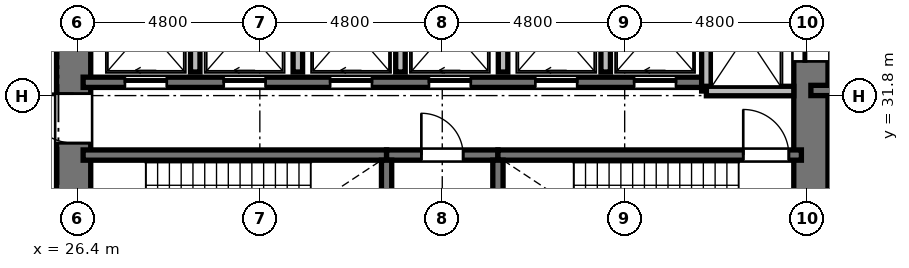
"""IFC4 building model, lengths in metres.
Left out: names, types, materials, properties, quantities, classifications, styles, units other than length and angle.
Written with IfcOpenShell. Run it as: python <this file> out.ifc"""

import sys

from ifc_helpers import new_model, si_unit, direction, frame, frame_2d, origin, place, context, subcontext, project, spatial, rectangle, extrude, element, fill, save


model = new_model("IFC4")
c1 = context("Model", 3, precision=1e-05, world=origin(), true_north=direction((0.0, 1.0)))
c2 = subcontext(c1, "Body", "Model", "MODEL_VIEW")
j1 = project(units=[si_unit("LENGTHUNIT", "METRE"), si_unit("PLANEANGLEUNIT", "RADIAN")], contexts=[c1])
p1 = place(None, origin())
s1 = spatial("IfcSite", under=j1, at=p1, CompositionType="ELEMENT")
p2 = place(p1, origin())
s2 = spatial("IfcBuilding", under=s1, at=p2, CompositionType="ELEMENT")
p3 = place(p2, frame((0.0, 0.0, 20.4)))
s3 = spatial("IfcBuildingStorey", under=s2, at=p3, CompositionType="ELEMENT", Elevation=20.4)
p4 = place(p3, frame((26.3, 20.95, 0.0), z_axis=(0.0, 0.0, 1.0), x_axis=(0.0, 1.0, 0.0)))
e1 = element("IfcWall", 1, at=p4, inside=s3, PredefinedType="SHEAR", context=c2, shape_type="SweptSolid", body=[
    extrude(rectangle(XDim=14.1, YDim=0.9, at=frame_2d((7.05, 0.0))), origin(), (0.0, 0.0, 1.0), 4.8),
])
p5 = place(p4, frame((6.5, 0.0, 0.0)))
e2 = element("IfcOpeningElement", 2, at=p5, cuts=e1, PredefinedType="OPENING", context=c2, shape_type="SweptSolid", body=[
    extrude(rectangle(XDim=1.2, YDim=2.15, at=frame_2d((0.6, 1.075))), frame((0.0, 0.46, 0.0), z_axis=(0.0, -1.0, 0.0), x_axis=(1.0, 0.0, 0.0)), (0.0, 0.0, 1.0), 0.92),
])
p6 = place(p4, frame((9.6, 0.0, 0.0)))
e3 = element("IfcOpeningElement", 3, at=p6, cuts=e1, PredefinedType="OPENING", context=c2, shape_type="SweptSolid", body=[
    extrude(rectangle(XDim=1.3, YDim=2.2, at=frame_2d((0.65, 1.1))), frame((0.0, 0.46, 0.0), z_axis=(0.0, -1.0, 0.0), x_axis=(1.0, 0.0, 0.0)), (0.0, 0.0, 1.0), 0.92),
])
p7 = place(p4, frame((3.26, 0.0, 0.0)))
e4 = element("IfcOpeningElement", 4, at=p7, cuts=e1, PredefinedType="OPENING", context=c2, shape_type="SweptSolid", body=[
    extrude(rectangle(XDim=1.3, YDim=2.2, at=frame_2d((0.65, 1.1))), frame((0.0, 0.46, 0.0), z_axis=(0.0, -1.0, 0.0), x_axis=(1.0, 0.0, 0.0)), (0.0, 0.0, 1.0), 0.92),
])
p8 = place(p3, frame((45.7, 20.95, 0.0), z_axis=(0.0, 0.0, 1.0), x_axis=(0.0, 1.0, 0.0)))
e5 = element("IfcWall", 5, at=p8, inside=s3, PredefinedType="SHEAR", context=c2, shape_type="SweptSolid", body=[
    extrude(rectangle(XDim=14.1, YDim=0.9, at=frame_2d((7.05, 0.0))), origin(), (0.0, 0.0, 1.0), 4.8),
])
p9 = place(p8, frame((11.75, 0.0, 0.0)))
e6 = element("IfcOpeningElement", 6, at=p9, cuts=e5, PredefinedType="OPENING", context=c2, shape_type="SweptSolid", body=[
    extrude(rectangle(XDim=1.4, YDim=2.3, at=frame_2d((0.7, 1.15))), frame((0.0, 0.46, 0.0), z_axis=(0.0, -1.0, 0.0), x_axis=(1.0, 0.0, 0.0)), (0.0, 0.0, 1.0), 0.92),
])
p10 = place(p8, frame((0.95, 0.0, 0.0)))
e7 = element("IfcOpeningElement", 7, at=p10, cuts=e5, PredefinedType="OPENING", context=c2, shape_type="SweptSolid", body=[
    extrude(rectangle(XDim=1.4, YDim=2.3, at=frame_2d((0.7, 1.15))), frame((0.0, 0.46, 0.0), z_axis=(0.0, -1.0, 0.0), x_axis=(1.0, 0.0, 0.0)), (0.0, 0.0, 1.0), 0.92),
])
p11 = place(p3, frame((26.55, 30.235, 0.0), z_axis=(0.0, 0.0, 1.0), x_axis=(1.0, 0.0, 0.0)))
e8 = element("IfcWall", 8, at=p11, inside=s3, PredefinedType="SHEAR", context=c2, shape_type="SweptSolid", body=[
    extrude(rectangle(XDim=7.985, YDim=0.27, at=frame_2d((3.992, 0.0))), origin(), (0.0, 0.0, 1.0), 4.8),
])
p12 = place(p3, frame((34.535, 30.235, 0.0), z_axis=(0.0, 0.0, 1.0), x_axis=(1.0, 0.0, 0.0)))
e9 = element("IfcWall", 9, at=p12, inside=s3, PredefinedType="SHEAR", context=c2, shape_type="SweptSolid", body=[
    extrude(rectangle(XDim=2.93, YDim=0.27, at=frame_2d((1.465, 0.0))), origin(), (0.0, 0.0, 1.0), 4.8),
])
p13 = place(p12, frame((0.915, 0.0, 0.0)))
e10 = element("IfcOpeningElement", 10, at=p13, cuts=e9, PredefinedType="OPENING", context=c2, shape_type="SweptSolid", body=[
    extrude(rectangle(XDim=1.1, YDim=2.15, at=frame_2d((0.55, 1.075))), frame((0.0, 0.145, 0.0), z_axis=(0.0, -1.0, 0.0), x_axis=(1.0, 0.0, 0.0)), (0.0, 0.0, 1.0), 0.29),
])
p14 = place(p3, frame((37.465, 30.235, 0.0), z_axis=(0.0, 0.0, 1.0), x_axis=(1.0, 0.0, 0.0)))
e11 = element("IfcWall", 11, at=p14, inside=s3, PredefinedType="SHEAR", context=c2, shape_type="SweptSolid", body=[
    extrude(rectangle(XDim=7.985, YDim=0.27, at=frame_2d((3.992, 0.0))), origin(), (0.0, 0.0, 1.0), 4.8),
])
p15 = place(p14, frame((6.455, 0.0, 0.0)))
e12 = element("IfcOpeningElement", 12, at=p15, cuts=e11, PredefinedType="OPENING", context=c2, shape_type="SweptSolid", body=[
    extrude(rectangle(XDim=1.2, YDim=2.15, at=frame_2d((0.6, 1.075))), frame((0.0, 0.145, 0.0), z_axis=(0.0, -1.0, 0.0), x_axis=(1.0, 0.0, 0.0)), (0.0, 0.0, 1.0), 0.29),
])
for number, where, z_axis, x_axis in (
    (13, (34.535, 26.02, 0.0), (0.0, 0.0, 1.0), (0.0, 1.0, 0.0)),
    (14, (37.465, 26.02, 0.0), (0.0, 0.0, 1.0), (0.0, 1.0, 0.0)),
):
    element("IfcWall", number, at=place(p3, frame(where, z_axis=z_axis, x_axis=x_axis)), inside=s3, PredefinedType="SHEAR", context=c2, shape_type="SweptSolid", body=[
        extrude(rectangle(XDim=4.08, YDim=0.27, at=frame_2d((2.04, 0.0))), origin(), (0.0, 0.0, 1.0), 4.8),
    ])
p16 = place(p3, frame((26.55, 32.15, 0.0), z_axis=(0.0, 0.0, 1.0), x_axis=(1.0, 0.0, 0.0)))
e15 = element("IfcWall", 15, at=p16, inside=s3, PredefinedType="SHEAR", context=c2, shape_type="SweptSolid", body=[
    extrude(rectangle(XDim=16.4, YDim=0.27, at=frame_2d((8.2, 0.0))), origin(), (0.0, 0.0, 1.0), 4.8),
])
p17 = place(p16, frame((1.1, 0.0, 0.0)))
e16 = element("IfcOpeningElement", 16, at=p17, cuts=e15, PredefinedType="OPENING", context=c2, shape_type="SweptSolid", body=[
    extrude(rectangle(XDim=1.1, YDim=2.2, at=frame_2d((0.55, 1.1))), frame((0.0, 0.145, 0.0), z_axis=(0.0, -1.0, 0.0), x_axis=(1.0, 0.0, 0.0)), (0.0, 0.0, 1.0), 0.29),
])
p18 = place(p16, frame((3.7, 0.0, 0.0)))
e17 = element("IfcOpeningElement", 17, at=p18, cuts=e15, PredefinedType="OPENING", context=c2, shape_type="SweptSolid", body=[
    extrude(rectangle(XDim=1.1, YDim=2.2, at=frame_2d((0.55, 1.1))), frame((0.0, 0.145, 0.0), z_axis=(0.0, -1.0, 0.0), x_axis=(1.0, 0.0, 0.0)), (0.0, 0.0, 1.0), 0.29),
])
p19 = place(p16, frame((6.5, 0.0, 0.0)))
e18 = element("IfcOpeningElement", 18, at=p19, cuts=e15, PredefinedType="OPENING", context=c2, shape_type="SweptSolid", body=[
    extrude(rectangle(XDim=1.1, YDim=2.2, at=frame_2d((0.55, 1.1))), frame((0.0, 0.145, 0.0), z_axis=(0.0, -1.0, 0.0), x_axis=(1.0, 0.0, 0.0)), (0.0, 0.0, 1.0), 0.29),
])
p20 = place(p16, frame((9.1, 0.0, 0.0)))
e19 = element("IfcOpeningElement", 19, at=p20, cuts=e15, PredefinedType="OPENING", context=c2, shape_type="SweptSolid", body=[
    extrude(rectangle(XDim=1.1, YDim=2.2, at=frame_2d((0.55, 1.1))), frame((0.0, 0.145, 0.0), z_axis=(0.0, -1.0, 0.0), x_axis=(1.0, 0.0, 0.0)), (0.0, 0.0, 1.0), 0.29),
])
p21 = place(p16, frame((11.9, 0.0, 0.0)))
e20 = element("IfcOpeningElement", 20, at=p21, cuts=e15, PredefinedType="OPENING", context=c2, shape_type="SweptSolid", body=[
    extrude(rectangle(XDim=1.1, YDim=2.2, at=frame_2d((0.55, 1.1))), frame((0.0, 0.145, 0.0), z_axis=(0.0, -1.0, 0.0), x_axis=(1.0, 0.0, 0.0)), (0.0, 0.0, 1.0), 0.29),
])
p22 = place(p16, frame((14.5, 0.0, 0.0)))
e21 = element("IfcOpeningElement", 21, at=p22, cuts=e15, PredefinedType="OPENING", context=c2, shape_type="SweptSolid", body=[
    extrude(rectangle(XDim=1.1, YDim=2.2, at=frame_2d((0.55, 1.1))), frame((0.0, 0.145, 0.0), z_axis=(0.0, -1.0, 0.0), x_axis=(1.0, 0.0, 0.0)), (0.0, 0.0, 1.0), 0.29),
])
p23 = place(p3, frame((42.95, 31.92, 0.0), z_axis=(0.0, 0.0, 1.0), x_axis=(0.0, 1.0, 0.0)))
e22 = element("IfcWall", 22, at=p23, inside=s3, PredefinedType="SOLIDWALL", context=c2, shape_type="SweptSolid", body=[
    extrude(rectangle(XDim=3.18, YDim=0.25, at=frame_2d((1.59, 0.0))), origin(), (0.0, 0.0, 1.0), 4.58),
])
p24 = place(p3, frame((42.95, 31.92, 0.0), z_axis=(0.0, 0.0, 1.0), x_axis=(1.0, 0.0, 0.0)))
e23 = element("IfcWall", 23, at=p24, inside=s3, PredefinedType="SOLIDWALL", context=c2, shape_type="SweptSolid", body=[
    extrude(rectangle(XDim=2.3, YDim=0.25, at=frame_2d((1.15, 0.0))), origin(), (0.0, 0.0, 1.0), 4.58),
])
for number, where, z_axis, x_axis in (
    (24, (29.5, 32.42, 0.0), (0.0, 0.0, 1.0), (0.0, 1.0, 0.0)),
    (25, (32.2, 32.42, 0.0), (0.0, 0.0, 1.0), (0.0, 1.0, 0.0)),
    (26, (34.9, 32.42, 0.0), (0.0, 0.0, 1.0), (0.0, 1.0, 0.0)),
    (27, (37.6, 32.42, 0.0), (0.0, 0.0, 1.0), (0.0, 1.0, 0.0)),
    (28, (40.3, 32.42, 0.0), (0.0, 0.0, 1.0), (0.0, 1.0, 0.0)),
):
    element("IfcWall", number, at=place(p3, frame(where, z_axis=z_axis, x_axis=x_axis)), inside=s3, PredefinedType="SOLIDWALL", context=c2, shape_type="SweptSolid", body=[
        extrude(rectangle(XDim=2.68, YDim=0.25, at=frame_2d((1.34, 0.0))), origin(), (0.0, 0.0, 1.0), 4.58),
    ])
p25 = place(p3, frame((45.7, 31.935, 0.0), z_axis=(0.0, 0.0, 1.0), x_axis=(1.0, 0.0, 0.0)))
e29 = element("IfcWall", 29, at=p25, inside=s3, PredefinedType="SHEAR", context=c2, shape_type="SweptSolid", body=[
    extrude(rectangle(XDim=4.715, YDim=0.27, at=frame_2d((2.357, 0.0))), origin(), (0.0, 0.0, 1.0), 4.8),
])
p26 = place(p15, origin())
e30 = element("IfcDoor", 30, at=p26, inside=s3, OperationType="SINGLE_SWING_LEFT", PredefinedType="DOOR", context=c2, shape_type="SweptSolid", body=[
    extrude(rectangle(XDim=1.2, YDim=2.15, at=frame_2d((0.6, 1.075))), frame((0.0, 0.025, 0.0), z_axis=(0.0, -1.0, 0.0), x_axis=(1.0, 0.0, 0.0)), (0.0, 0.0, 1.0), 0.05),
])
fill(e12, e30)
p27 = place(p13, origin())
e31 = element("IfcDoor", 31, at=p27, inside=s3, OperationType="SINGLE_SWING_LEFT", PredefinedType="DOOR", context=c2, shape_type="SweptSolid", body=[
    extrude(rectangle(XDim=1.1, YDim=2.15, at=frame_2d((0.55, 1.075))), frame((0.0, 0.025, 0.0), z_axis=(0.0, -1.0, 0.0), x_axis=(1.0, 0.0, 0.0)), (0.0, 0.0, 1.0), 0.05),
])
fill(e10, e31)
p28 = place(p6, origin())
e32 = element("IfcDoor", 32, at=p28, inside=s3, OperationType="SINGLE_SWING_RIGHT", PredefinedType="DOOR", context=c2, shape_type="SweptSolid", body=[
    extrude(rectangle(XDim=1.3, YDim=2.2, at=frame_2d((0.65, 1.1))), frame((0.0, 0.025, 0.0), z_axis=(0.0, -1.0, 0.0), x_axis=(1.0, 0.0, 0.0)), (0.0, 0.0, 1.0), 0.05),
])
fill(e3, e32)
p29 = place(p17, origin())
e33 = element("IfcDoor", 33, at=p29, inside=s3, OperationType="SLIDING_TO_LEFT", PredefinedType="DOOR", context=c2, shape_type="SweptSolid", body=[
    extrude(rectangle(XDim=1.1, YDim=2.2, at=frame_2d((0.55, 1.1))), frame((0.0, 0.025, 0.0), z_axis=(0.0, -1.0, 0.0), x_axis=(1.0, 0.0, 0.0)), (0.0, 0.0, 1.0), 0.05),
])
fill(e16, e33)
p30 = place(p18, origin())
e34 = element("IfcDoor", 34, at=p30, inside=s3, OperationType="SLIDING_TO_LEFT", PredefinedType="DOOR", context=c2, shape_type="SweptSolid", body=[
    extrude(rectangle(XDim=1.1, YDim=2.2, at=frame_2d((0.55, 1.1))), frame((0.0, 0.025, 0.0), z_axis=(0.0, -1.0, 0.0), x_axis=(1.0, 0.0, 0.0)), (0.0, 0.0, 1.0), 0.05),
])
fill(e17, e34)
p31 = place(p19, origin())
e35 = element("IfcDoor", 35, at=p31, inside=s3, OperationType="SLIDING_TO_LEFT", PredefinedType="DOOR", context=c2, shape_type="SweptSolid", body=[
    extrude(rectangle(XDim=1.1, YDim=2.2, at=frame_2d((0.55, 1.1))), frame((0.0, 0.025, 0.0), z_axis=(0.0, -1.0, 0.0), x_axis=(1.0, 0.0, 0.0)), (0.0, 0.0, 1.0), 0.05),
])
fill(e18, e35)
p32 = place(p20, origin())
e36 = element("IfcDoor", 36, at=p32, inside=s3, OperationType="SLIDING_TO_LEFT", PredefinedType="DOOR", context=c2, shape_type="SweptSolid", body=[
    extrude(rectangle(XDim=1.1, YDim=2.2, at=frame_2d((0.55, 1.1))), frame((0.0, 0.025, 0.0), z_axis=(0.0, -1.0, 0.0), x_axis=(1.0, 0.0, 0.0)), (0.0, 0.0, 1.0), 0.05),
])
fill(e19, e36)
p33 = place(p21, origin())
e37 = element("IfcDoor", 37, at=p33, inside=s3, OperationType="SLIDING_TO_LEFT", PredefinedType="DOOR", context=c2, shape_type="SweptSolid", body=[
    extrude(rectangle(XDim=1.1, YDim=2.2, at=frame_2d((0.55, 1.1))), frame((0.0, 0.025, 0.0), z_axis=(0.0, -1.0, 0.0), x_axis=(1.0, 0.0, 0.0)), (0.0, 0.0, 1.0), 0.05),
])
fill(e20, e37)
p34 = place(p22, origin())
e38 = element("IfcDoor", 38, at=p34, inside=s3, OperationType="SLIDING_TO_LEFT", PredefinedType="DOOR", context=c2, shape_type="SweptSolid", body=[
    extrude(rectangle(XDim=1.1, YDim=2.2, at=frame_2d((0.55, 1.1))), frame((0.0, 0.025, 0.0), z_axis=(0.0, -1.0, 0.0), x_axis=(1.0, 0.0, 0.0)), (0.0, 0.0, 1.0), 0.05),
])
fill(e21, e38)
p35 = place(p9, origin())
e39 = element("IfcDoor", 39, at=p35, inside=s3, OperationType="SLIDING_TO_LEFT", PredefinedType="DOOR", context=c2, shape_type="SweptSolid", body=[
    extrude(rectangle(XDim=1.4, YDim=2.3, at=frame_2d((0.7, 1.15))), frame((0.0, 0.025, 0.0), z_axis=(0.0, -1.0, 0.0), x_axis=(1.0, 0.0, 0.0)), (0.0, 0.0, 1.0), 0.05),
])
fill(e6, e39)
save(model, sys.argv[1])
